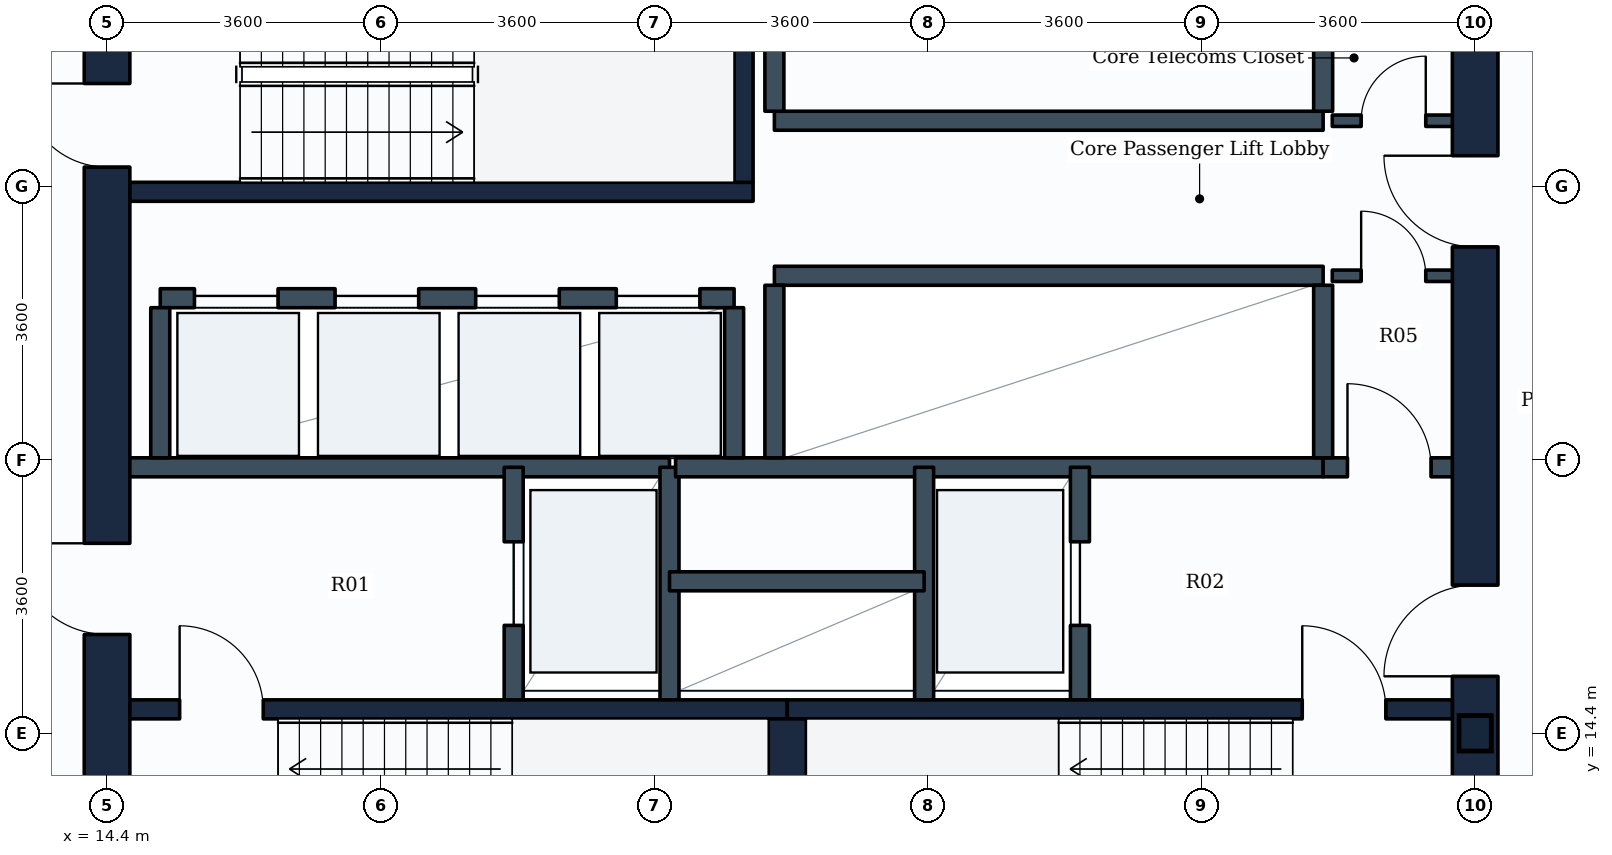
"""IFC4 building model, lengths in metres.
Left out: names, types, materials, properties, quantities, classifications, styles, units other than length and angle.
Written with IfcOpenShell. Run it as: python <this file> out.ifc"""

import sys

from ifc_helpers import new_model, si_unit, direction, frame, frame_2d, origin, origin_2d, place, context, subcontext, project, spatial, rectangle, i_section, extrude, element, fill, save


model = new_model("IFC4")
c1 = context("Model", 3, precision=1e-05, world=origin(), true_north=direction((0.0, 1.0)))
c2 = subcontext(c1, "Body", "Model", "MODEL_VIEW")
j1 = project(units=[si_unit("LENGTHUNIT", "METRE"), si_unit("PLANEANGLEUNIT", "RADIAN")], contexts=[c1])
p1 = place(None, origin())
s1 = spatial("IfcSite", under=j1, at=p1, CompositionType="ELEMENT")
p2 = place(p1, origin())
s2 = spatial("IfcBuilding", under=s1, at=p2, CompositionType="ELEMENT")
p3 = place(p2, frame((0.0, 0.0, 91.8)))
s3 = spatial("IfcBuildingStorey", under=s2, at=p3, CompositionType="ELEMENT", Elevation=91.8)
p4 = place(p3, frame((32.4, 14.4, 0.0), z_axis=(0.0, 0.0, 1.0), x_axis=(1.0, 0.0, 0.0)))
e1 = element("IfcColumn", 1, at=p4, inside=s3, PredefinedType="COLUMN", context=c2, shape_type="SweptSolid", body=[
    extrude(i_section(OverallWidth=0.424, OverallDepth=0.467, WebThickness=0.033, FlangeThickness=0.053, FilletRadius=0.015, at=origin_2d()), origin(), (0.0, 0.0, 1.0), 3.9),
])
p5 = place(p3, frame((14.4, 10.8, 0.0), z_axis=(0.0, 0.0, 1.0), x_axis=(0.0, 1.0, 0.0)))
e2 = element("IfcWall", 2, at=p5, inside=s3, PredefinedType="SHEAR", context=c2, shape_type="SweptSolid", body=[
    extrude(rectangle(XDim=14.4, YDim=0.6, at=frame_2d((7.2, 0.0))), origin(), (0.0, 0.0, 1.0), 3.65),
])
p6 = place(p5, frame((11.05, 0.0, 0.0)))
e3 = element("IfcOpeningElement", 3, at=p6, cuts=e2, PredefinedType="OPENING", context=c2, shape_type="SweptSolid", body=[
    extrude(rectangle(XDim=1.1, YDim=2.1, at=frame_2d((0.55, 1.05))), frame((0.0, 0.31, 0.0), z_axis=(0.0, -1.0, 0.0), x_axis=(1.0, 0.0, 0.0)), (0.0, 0.0, 1.0), 0.62),
])
p7 = place(p5, frame((4.9, 0.0, 0.0)))
e4 = element("IfcOpeningElement", 4, at=p7, cuts=e2, PredefinedType="OPENING", context=c2, shape_type="SweptSolid", body=[
    extrude(rectangle(XDim=1.2, YDim=2.1, at=frame_2d((0.6, 1.05))), frame((0.0, 0.31, 0.0), z_axis=(0.0, -1.0, 0.0), x_axis=(1.0, 0.0, 0.0)), (0.0, 0.0, 1.0), 0.62),
])
p8 = place(p3, frame((32.4, 10.8, 0.0), z_axis=(0.0, 0.0, 1.0), x_axis=(0.0, 1.0, 0.0)))
e5 = element("IfcWall", 5, at=p8, inside=s3, PredefinedType="SHEAR", context=c2, shape_type="SweptSolid", body=[
    extrude(rectangle(XDim=14.4, YDim=0.6, at=frame_2d((7.2, 0.0))), origin(), (0.0, 0.0, 1.0), 3.65),
])
p9 = place(p8, frame((4.35, 0.0, 0.0)))
e6 = element("IfcOpeningElement", 6, at=p9, cuts=e5, PredefinedType="OPENING", context=c2, shape_type="SweptSolid", body=[
    extrude(rectangle(XDim=1.2, YDim=2.1, at=frame_2d((0.6, 1.05))), frame((0.0, 0.31, 0.0), z_axis=(0.0, -1.0, 0.0), x_axis=(1.0, 0.0, 0.0)), (0.0, 0.0, 1.0), 0.62),
])
p10 = place(p8, frame((10.0, 0.0, 0.0)))
e7 = element("IfcOpeningElement", 7, at=p10, cuts=e5, PredefinedType="OPENING", context=c2, shape_type="SweptSolid", body=[
    extrude(rectangle(XDim=1.2, YDim=2.1, at=frame_2d((0.6, 1.05))), frame((0.0, 0.31, 0.0), z_axis=(0.0, -1.0, 0.0), x_axis=(1.0, 0.0, 0.0)), (0.0, 0.0, 1.0), 0.62),
])
p11 = place(p3, frame((14.7, 14.715, 0.0), z_axis=(0.0, 0.0, 1.0), x_axis=(1.0, 0.0, 0.0)))
e8 = element("IfcWall", 8, at=p11, inside=s3, PredefinedType="SHEAR", context=c2, shape_type="SweptSolid", body=[
    extrude(rectangle(XDim=8.65, YDim=0.25, at=frame_2d((4.325, 0.0))), origin(), (0.0, 0.0, 1.0), 3.65),
])
p12 = place(p11, frame((0.655, 0.0, 0.0)))
e9 = element("IfcOpeningElement", 9, at=p12, cuts=e8, PredefinedType="OPENING", context=c2, shape_type="SweptSolid", body=[
    extrude(rectangle(XDim=1.1, YDim=2.1, at=frame_2d((0.55, 1.05))), frame((0.0, 0.135, 0.0), z_axis=(0.0, -1.0, 0.0), x_axis=(1.0, 0.0, 0.0)), (0.0, 0.0, 1.0), 0.27),
])
p13 = place(p3, frame((23.35, 14.715, 0.0), z_axis=(0.0, 0.0, 1.0), x_axis=(1.0, 0.0, 0.0)))
e10 = element("IfcWall", 10, at=p13, inside=s3, PredefinedType="SHEAR", context=c2, shape_type="SweptSolid", body=[
    extrude(rectangle(XDim=8.75, YDim=0.25, at=frame_2d((4.375, 0.0))), origin(), (0.0, 0.0, 1.0), 3.65),
])
p14 = place(p13, frame((6.775, 0.0, 0.0)))
e11 = element("IfcOpeningElement", 11, at=p14, cuts=e10, PredefinedType="OPENING", context=c2, shape_type="SweptSolid", body=[
    extrude(rectangle(XDim=1.1, YDim=2.1, at=frame_2d((0.55, 1.05))), frame((0.0, 0.135, 0.0), z_axis=(0.0, -1.0, 0.0), x_axis=(1.0, 0.0, 0.0)), (0.0, 0.0, 1.0), 0.27),
])
p15 = place(p3, frame((23.35, 11.75, 0.0), z_axis=(0.0, 0.0, 1.0), x_axis=(0.0, 1.0, 0.0)))
e12 = element("IfcWall", 12, at=p15, inside=s3, PredefinedType="SHEAR", context=c2, shape_type="SweptSolid", body=[
    extrude(rectangle(XDim=2.84, YDim=0.5, at=frame_2d((1.42, 0.0))), origin(), (0.0, 0.0, 1.0), 3.65),
])
p16 = place(p3, frame((14.7, 21.525, 0.0), z_axis=(0.0, 0.0, 1.0), x_axis=(1.0, 0.0, 0.0)))
e13 = element("IfcWall", 13, at=p16, inside=s3, PredefinedType="SHEAR", context=c2, shape_type="SweptSolid", body=[
    extrude(rectangle(XDim=8.2, YDim=0.25, at=frame_2d((4.1, 0.0))), origin(), (0.0, 0.0, 1.0), 3.65),
])
p17 = place(p3, frame((22.775, 21.65, 0.0), z_axis=(0.0, 0.0, 1.0), x_axis=(0.0, 1.0, 0.0)))
e14 = element("IfcWall", 14, at=p17, inside=s3, PredefinedType="SHEAR", context=c2, shape_type="SweptSolid", body=[
    extrude(rectangle(XDim=2.84, YDim=0.25, at=frame_2d((1.42, 0.0))), origin(), (0.0, 0.0, 1.0), 3.65),
])
p18 = place(p3, frame((14.65, 17.9, 0.0), z_axis=(0.0, 0.0, 1.0), x_axis=(1.0, 0.0, 0.0)))
e15 = element("IfcWall", 15, at=p18, inside=s3, PredefinedType="PARTITIONING", context=c2, shape_type="SweptSolid", body=[
    extrude(rectangle(XDim=7.15, YDim=0.25, at=frame_2d((3.575, 0.0))), origin(), (0.0, 0.0, 1.0), 3.635),
])
p19 = place(p3, frame((19.75, 14.84, 0.0), z_axis=(0.0, 0.0, 1.0), x_axis=(0.0, 1.0, 0.0)))
e16 = element("IfcWall", 16, at=p19, inside=s3, PredefinedType="PARTITIONING", context=c2, shape_type="SweptSolid", body=[
    extrude(rectangle(XDim=3.06, YDim=0.25, at=frame_2d((1.53, 0.0))), origin(), (0.0, 0.0, 1.0), 3.635),
])
p20 = place(p19, frame((0.98, 0.0, 0.0)))
e17 = element("IfcOpeningElement", 17, at=p20, cuts=e16, PredefinedType="OPENING", context=c2, shape_type="SweptSolid", body=[
    extrude(rectangle(XDim=1.1, YDim=2.1, at=frame_2d((0.55, 1.05))), frame((0.0, 0.135, 0.0), z_axis=(0.0, -1.0, 0.0), x_axis=(1.0, 0.0, 0.0)), (0.0, 0.0, 1.0), 0.27),
])
p21 = place(p3, frame((21.8, 14.84, 0.0), z_axis=(0.0, 0.0, 1.0), x_axis=(0.0, 1.0, 0.0)))
e18 = element("IfcWall", 18, at=p21, inside=s3, PredefinedType="PARTITIONING", context=c2, shape_type="SweptSolid", body=[
    extrude(rectangle(XDim=3.06, YDim=0.25, at=frame_2d((1.53, 0.0))), origin(), (0.0, 0.0, 1.0), 3.635),
])
p22 = place(p3, frame((21.88, 17.9, 0.0), z_axis=(0.0, 0.0, 1.0), x_axis=(1.0, 0.0, 0.0)))
e19 = element("IfcWall", 19, at=p22, inside=s3, PredefinedType="PARTITIONING", context=c2, shape_type="SweptSolid", body=[
    extrude(rectangle(XDim=8.52, YDim=0.25, at=frame_2d((4.26, 0.0))), origin(), (0.0, 0.0, 1.0), 3.635),
])
p23 = place(p3, frame((30.4, 17.9, 0.0), z_axis=(0.0, 0.0, 1.0), x_axis=(1.0, 0.0, 0.0)))
e20 = element("IfcWall", 20, at=p23, inside=s3, PredefinedType="PARTITIONING", context=c2, shape_type="SweptSolid", body=[
    extrude(rectangle(XDim=1.75, YDim=0.25, at=frame_2d((0.875, 0.0))), origin(), (0.0, 0.0, 1.0), 3.635),
])
p24 = place(p23, frame((0.32, 0.0, 0.0)))
e21 = element("IfcOpeningElement", 21, at=p24, cuts=e20, PredefinedType="OPENING", context=c2, shape_type="SweptSolid", body=[
    extrude(rectangle(XDim=1.1, YDim=2.1, at=frame_2d((0.55, 1.05))), frame((0.0, 0.135, 0.0), z_axis=(0.0, -1.0, 0.0), x_axis=(1.0, 0.0, 0.0)), (0.0, 0.0, 1.0), 0.27),
])
p25 = place(p3, frame((25.15, 14.84, 0.0), z_axis=(0.0, 0.0, 1.0), x_axis=(0.0, 1.0, 0.0)))
e22 = element("IfcWall", 22, at=p25, inside=s3, PredefinedType="PARTITIONING", context=c2, shape_type="SweptSolid", body=[
    extrude(rectangle(XDim=3.06, YDim=0.25, at=frame_2d((1.53, 0.0))), origin(), (0.0, 0.0, 1.0), 3.635),
])
p26 = place(p3, frame((27.2, 14.84, 0.0), z_axis=(0.0, 0.0, 1.0), x_axis=(0.0, 1.0, 0.0)))
e23 = element("IfcWall", 23, at=p26, inside=s3, PredefinedType="PARTITIONING", context=c2, shape_type="SweptSolid", body=[
    extrude(rectangle(XDim=3.06, YDim=0.25, at=frame_2d((1.53, 0.0))), origin(), (0.0, 0.0, 1.0), 3.635),
])
p27 = place(p26, frame((0.98, 0.0, 0.0)))
e24 = element("IfcOpeningElement", 24, at=p27, cuts=e23, PredefinedType="OPENING", context=c2, shape_type="SweptSolid", body=[
    extrude(rectangle(XDim=1.1, YDim=2.1, at=frame_2d((0.55, 1.05))), frame((0.0, 0.135, 0.0), z_axis=(0.0, -1.0, 0.0), x_axis=(1.0, 0.0, 0.0)), (0.0, 0.0, 1.0), 0.27),
])
p28 = place(p3, frame((21.8, 16.4, 0.0), z_axis=(0.0, 0.0, 1.0), x_axis=(1.0, 0.0, 0.0)))
e25 = element("IfcWall", 25, at=p28, inside=s3, PredefinedType="PARTITIONING", context=c2, shape_type="SweptSolid", body=[
    extrude(rectangle(XDim=3.35, YDim=0.25, at=frame_2d((1.675, 0.0))), origin(), (0.0, 0.0, 1.0), 3.635),
])
p29 = place(p3, frame((15.1, 20.125, 0.0), z_axis=(0.0, 0.0, 1.0), x_axis=(1.0, 0.0, 0.0)))
e26 = element("IfcWall", 26, at=p29, inside=s3, PredefinedType="PARTITIONING", context=c2, shape_type="SweptSolid", body=[
    extrude(rectangle(XDim=7.55, YDim=0.25, at=frame_2d((3.775, 0.0))), origin(), (0.0, 0.0, 1.0), 3.635),
])
p30 = place(p29, frame((0.45, 0.0, 0.0)))
e27 = element("IfcOpeningElement", 27, at=p30, cuts=e26, PredefinedType="OPENING", context=c2, shape_type="SweptSolid", body=[
    extrude(rectangle(XDim=1.1, YDim=2.1, at=frame_2d((0.55, 1.05))), frame((0.0, 0.135, 0.0), z_axis=(0.0, -1.0, 0.0), x_axis=(1.0, 0.0, 0.0)), (0.0, 0.0, 1.0), 0.27),
])
p31 = place(p29, frame((2.3, 0.0, 0.0)))
e28 = element("IfcOpeningElement", 28, at=p31, cuts=e26, PredefinedType="OPENING", context=c2, shape_type="SweptSolid", body=[
    extrude(rectangle(XDim=1.1, YDim=2.1, at=frame_2d((0.55, 1.05))), frame((0.0, 0.135, 0.0), z_axis=(0.0, -1.0, 0.0), x_axis=(1.0, 0.0, 0.0)), (0.0, 0.0, 1.0), 0.27),
])
p32 = place(p29, frame((4.15, 0.0, 0.0)))
e29 = element("IfcOpeningElement", 29, at=p32, cuts=e26, PredefinedType="OPENING", context=c2, shape_type="SweptSolid", body=[
    extrude(rectangle(XDim=1.1, YDim=2.1, at=frame_2d((0.55, 1.05))), frame((0.0, 0.135, 0.0), z_axis=(0.0, -1.0, 0.0), x_axis=(1.0, 0.0, 0.0)), (0.0, 0.0, 1.0), 0.27),
])
p33 = place(p29, frame((6.0, 0.0, 0.0)))
e30 = element("IfcOpeningElement", 30, at=p33, cuts=e26, PredefinedType="OPENING", context=c2, shape_type="SweptSolid", body=[
    extrude(rectangle(XDim=1.1, YDim=2.1, at=frame_2d((0.55, 1.05))), frame((0.0, 0.135, 0.0), z_axis=(0.0, -1.0, 0.0), x_axis=(1.0, 0.0, 0.0)), (0.0, 0.0, 1.0), 0.27),
])
for number, where, z_axis, x_axis in (
    (31, (15.1, 18.025, 0.0), (0.0, 0.0, 1.0), (0.0, 1.0, 0.0)),
    (32, (22.65, 18.025, 0.0), (0.0, 0.0, 1.0), (0.0, 1.0, 0.0)),
):
    element("IfcWall", number, at=place(p3, frame(where, z_axis=z_axis, x_axis=x_axis)), inside=s3, PredefinedType="PARTITIONING", context=c2, shape_type="SweptSolid", body=[
        extrude(rectangle(XDim=1.975, YDim=0.25, at=frame_2d((0.988, 0.0))), origin(), (0.0, 0.0, 1.0), 3.635),
    ])
p34 = place(p3, frame((23.18, 20.42, 0.0), z_axis=(0.0, 0.0, 1.0), x_axis=(1.0, 0.0, 0.0)))
e33 = element("IfcWall", 33, at=p34, inside=s3, PredefinedType="PARTITIONING", context=c2, shape_type="SweptSolid", body=[
    extrude(rectangle(XDim=7.22, YDim=0.25, at=frame_2d((3.61, 0.0))), origin(), (0.0, 0.0, 1.0), 3.635),
])
for number, where, z_axis, x_axis in (
    (34, (23.18, 18.025, 0.0), (0.0, 0.0, 1.0), (0.0, 1.0, 0.0)),
    (35, (30.4, 18.025, 0.0), (0.0, 0.0, 1.0), (0.0, 1.0, 0.0)),
):
    element("IfcWall", number, at=place(p3, frame(where, z_axis=z_axis, x_axis=x_axis)), inside=s3, PredefinedType="PARTITIONING", context=c2, shape_type="SweptSolid", body=[
        extrude(rectangle(XDim=2.27, YDim=0.25, at=frame_2d((1.135, 0.0))), origin(), (0.0, 0.0, 1.0), 3.635),
    ])
p35 = place(p3, frame((23.18, 22.46, 0.0), z_axis=(0.0, 0.0, 1.0), x_axis=(1.0, 0.0, 0.0)))
e36 = element("IfcWall", 36, at=p35, inside=s3, PredefinedType="PARTITIONING", context=c2, shape_type="SweptSolid", body=[
    extrude(rectangle(XDim=7.22, YDim=0.25, at=frame_2d((3.61, 0.0))), origin(), (0.0, 0.0, 1.0), 3.635),
])
for number, where, z_axis, x_axis in (
    (37, (23.18, 22.585, 0.0), (0.0, 0.0, 1.0), (0.0, 1.0, 0.0)),
    (38, (30.4, 22.585, 0.0), (0.0, 0.0, 1.0), (0.0, 1.0, 0.0)),
):
    element("IfcWall", number, at=place(p3, frame(where, z_axis=z_axis, x_axis=x_axis)), inside=s3, PredefinedType="PARTITIONING", context=c2, shape_type="SweptSolid", body=[
        extrude(rectangle(XDim=2.315, YDim=0.25, at=frame_2d((1.157, 0.0))), origin(), (0.0, 0.0, 1.0), 3.635),
    ])
p36 = place(p3, frame((30.52, 22.46, 0.0), z_axis=(0.0, 0.0, 1.0), x_axis=(1.0, 0.0, 0.0)))
e39 = element("IfcWall", 39, at=p36, inside=s3, PredefinedType="PARTITIONING", context=c2, shape_type="SweptSolid", body=[
    extrude(rectangle(XDim=1.63, YDim=0.15, at=frame_2d((0.815, 0.0))), origin(), (0.0, 0.0, 1.0), 3.635),
])
p37 = place(p36, frame((0.38, 0.0, 0.0)))
e40 = element("IfcOpeningElement", 40, at=p37, cuts=e39, PredefinedType="OPENING", context=c2, shape_type="SweptSolid", body=[
    extrude(rectangle(XDim=0.85, YDim=2.1, at=frame_2d((0.425, 1.05))), frame((0.0, 0.085, 0.0), z_axis=(0.0, -1.0, 0.0), x_axis=(1.0, 0.0, 0.0)), (0.0, 0.0, 1.0), 0.17),
])
p38 = place(p3, frame((30.52, 20.42, 0.0), z_axis=(0.0, 0.0, 1.0), x_axis=(1.0, 0.0, 0.0)))
e41 = element("IfcWall", 41, at=p38, inside=s3, PredefinedType="PARTITIONING", context=c2, shape_type="SweptSolid", body=[
    extrude(rectangle(XDim=1.63, YDim=0.15, at=frame_2d((0.815, 0.0))), origin(), (0.0, 0.0, 1.0), 3.635),
])
p39 = place(p38, frame((0.38, 0.0, 0.0)))
e42 = element("IfcOpeningElement", 42, at=p39, cuts=e41, PredefinedType="OPENING", context=c2, shape_type="SweptSolid", body=[
    extrude(rectangle(XDim=0.85, YDim=2.1, at=frame_2d((0.425, 1.05))), frame((0.0, 0.085, 0.0), z_axis=(0.0, -1.0, 0.0), x_axis=(1.0, 0.0, 0.0)), (0.0, 0.0, 1.0), 0.17),
])
p40 = place(p12, origin())
e43 = element("IfcDoor", 43, at=p40, inside=s3, OperationType="SINGLE_SWING_LEFT", PredefinedType="DOOR", context=c2, shape_type="SweptSolid", body=[
    extrude(rectangle(XDim=1.1, YDim=2.1, at=frame_2d((0.55, 1.05))), frame((0.0, 0.025, 0.0), z_axis=(0.0, -1.0, 0.0), x_axis=(1.0, 0.0, 0.0)), (0.0, 0.0, 1.0), 0.05),
])
fill(e9, e43)
p41 = place(p14, origin())
e44 = element("IfcDoor", 44, at=p41, inside=s3, OperationType="SINGLE_SWING_LEFT", PredefinedType="DOOR", context=c2, shape_type="SweptSolid", body=[
    extrude(rectangle(XDim=1.1, YDim=2.1, at=frame_2d((0.55, 1.05))), frame((0.0, 0.025, 0.0), z_axis=(0.0, -1.0, 0.0), x_axis=(1.0, 0.0, 0.0)), (0.0, 0.0, 1.0), 0.05),
])
fill(e11, e44)
p42 = place(p6, origin())
e45 = element("IfcDoor", 45, at=p42, inside=s3, OperationType="SINGLE_SWING_RIGHT", PredefinedType="DOOR", context=c2, shape_type="SweptSolid", body=[
    extrude(rectangle(XDim=1.1, YDim=2.1, at=frame_2d((0.55, 1.05))), frame((0.0, 0.025, 0.0), z_axis=(0.0, -1.0, 0.0), x_axis=(1.0, 0.0, 0.0)), (0.0, 0.0, 1.0), 0.05),
])
fill(e3, e45)
p43 = place(p20, origin())
e46 = element("IfcDoor", 46, at=p43, inside=s3, OperationType="SLIDING_TO_LEFT", PredefinedType="DOOR", context=c2, shape_type="SweptSolid", body=[
    extrude(rectangle(XDim=1.1, YDim=2.1, at=frame_2d((0.55, 1.05))), frame((0.0, 0.025, 0.0), z_axis=(0.0, -1.0, 0.0), x_axis=(1.0, 0.0, 0.0)), (0.0, 0.0, 1.0), 0.05),
])
fill(e17, e46)
p44 = place(p27, origin())
e47 = element("IfcDoor", 47, at=p44, inside=s3, OperationType="SLIDING_TO_LEFT", PredefinedType="DOOR", context=c2, shape_type="SweptSolid", body=[
    extrude(rectangle(XDim=1.1, YDim=2.1, at=frame_2d((0.55, 1.05))), frame((0.0, 0.025, 0.0), z_axis=(0.0, -1.0, 0.0), x_axis=(1.0, 0.0, 0.0)), (0.0, 0.0, 1.0), 0.05),
])
fill(e24, e47)
p45 = place(p7, origin())
e48 = element("IfcDoor", 48, at=p45, inside=s3, OperationType="SINGLE_SWING_RIGHT", PredefinedType="DOOR", context=c2, shape_type="SweptSolid", body=[
    extrude(rectangle(XDim=1.2, YDim=2.1, at=frame_2d((0.6, 1.05))), frame((0.0, 0.025, 0.0), z_axis=(0.0, -1.0, 0.0), x_axis=(1.0, 0.0, 0.0)), (0.0, 0.0, 1.0), 0.05),
])
fill(e4, e48)
p46 = place(p9, origin())
e49 = element("IfcDoor", 49, at=p46, inside=s3, OperationType="SINGLE_SWING_LEFT", PredefinedType="DOOR", context=c2, shape_type="SweptSolid", body=[
    extrude(rectangle(XDim=1.2, YDim=2.1, at=frame_2d((0.6, 1.05))), frame((0.0, 0.025, 0.0), z_axis=(0.0, -1.0, 0.0), x_axis=(1.0, 0.0, 0.0)), (0.0, 0.0, 1.0), 0.05),
])
fill(e6, e49)
p47 = place(p24, origin())
e50 = element("IfcDoor", 50, at=p47, inside=s3, OperationType="SINGLE_SWING_LEFT", PredefinedType="DOOR", context=c2, shape_type="SweptSolid", body=[
    extrude(rectangle(XDim=1.1, YDim=2.1, at=frame_2d((0.55, 1.05))), frame((0.0, 0.025, 0.0), z_axis=(0.0, -1.0, 0.0), x_axis=(1.0, 0.0, 0.0)), (0.0, 0.0, 1.0), 0.05),
])
fill(e21, e50)
p48 = place(p30, origin())
e51 = element("IfcDoor", 51, at=p48, inside=s3, OperationType="SLIDING_TO_LEFT", PredefinedType="DOOR", context=c2, shape_type="SweptSolid", body=[
    extrude(rectangle(XDim=1.1, YDim=2.1, at=frame_2d((0.55, 1.05))), frame((0.0, 0.025, 0.0), z_axis=(0.0, -1.0, 0.0), x_axis=(1.0, 0.0, 0.0)), (0.0, 0.0, 1.0), 0.05),
])
fill(e27, e51)
p49 = place(p31, origin())
e52 = element("IfcDoor", 52, at=p49, inside=s3, OperationType="SLIDING_TO_LEFT", PredefinedType="DOOR", context=c2, shape_type="SweptSolid", body=[
    extrude(rectangle(XDim=1.1, YDim=2.1, at=frame_2d((0.55, 1.05))), frame((0.0, 0.025, 0.0), z_axis=(0.0, -1.0, 0.0), x_axis=(1.0, 0.0, 0.0)), (0.0, 0.0, 1.0), 0.05),
])
fill(e28, e52)
p50 = place(p32, origin())
e53 = element("IfcDoor", 53, at=p50, inside=s3, OperationType="SLIDING_TO_LEFT", PredefinedType="DOOR", context=c2, shape_type="SweptSolid", body=[
    extrude(rectangle(XDim=1.1, YDim=2.1, at=frame_2d((0.55, 1.05))), frame((0.0, 0.025, 0.0), z_axis=(0.0, -1.0, 0.0), x_axis=(1.0, 0.0, 0.0)), (0.0, 0.0, 1.0), 0.05),
])
fill(e29, e53)
p51 = place(p33, origin())
e54 = element("IfcDoor", 54, at=p51, inside=s3, OperationType="SLIDING_TO_LEFT", PredefinedType="DOOR", context=c2, shape_type="SweptSolid", body=[
    extrude(rectangle(XDim=1.1, YDim=2.1, at=frame_2d((0.55, 1.05))), frame((0.0, 0.025, 0.0), z_axis=(0.0, -1.0, 0.0), x_axis=(1.0, 0.0, 0.0)), (0.0, 0.0, 1.0), 0.05),
])
fill(e30, e54)
p52 = place(p10, origin())
e55 = element("IfcDoor", 55, at=p52, inside=s3, OperationType="SINGLE_SWING_RIGHT", PredefinedType="DOOR", context=c2, shape_type="SweptSolid", body=[
    extrude(rectangle(XDim=1.2, YDim=2.1, at=frame_2d((0.6, 1.05))), frame((0.0, 0.025, 0.0), z_axis=(0.0, -1.0, 0.0), x_axis=(1.0, 0.0, 0.0)), (0.0, 0.0, 1.0), 0.05),
])
fill(e7, e55)
p53 = place(p37, origin())
e56 = element("IfcDoor", 56, at=p53, inside=s3, OperationType="SINGLE_SWING_RIGHT", PredefinedType="DOOR", context=c2, shape_type="SweptSolid", body=[
    extrude(rectangle(XDim=0.85, YDim=2.1, at=frame_2d((0.425, 1.05))), frame((0.0, 0.025, 0.0), z_axis=(0.0, -1.0, 0.0), x_axis=(1.0, 0.0, 0.0)), (0.0, 0.0, 1.0), 0.05),
])
fill(e40, e56)
p54 = place(p39, origin())
e57 = element("IfcDoor", 57, at=p54, inside=s3, OperationType="SINGLE_SWING_LEFT", PredefinedType="DOOR", context=c2, shape_type="SweptSolid", body=[
    extrude(rectangle(XDim=0.85, YDim=2.1, at=frame_2d((0.425, 1.05))), frame((0.0, 0.025, 0.0), z_axis=(0.0, -1.0, 0.0), x_axis=(1.0, 0.0, 0.0)), (0.0, 0.0, 1.0), 0.05),
])
fill(e42, e57)
save(model, sys.argv[1])
